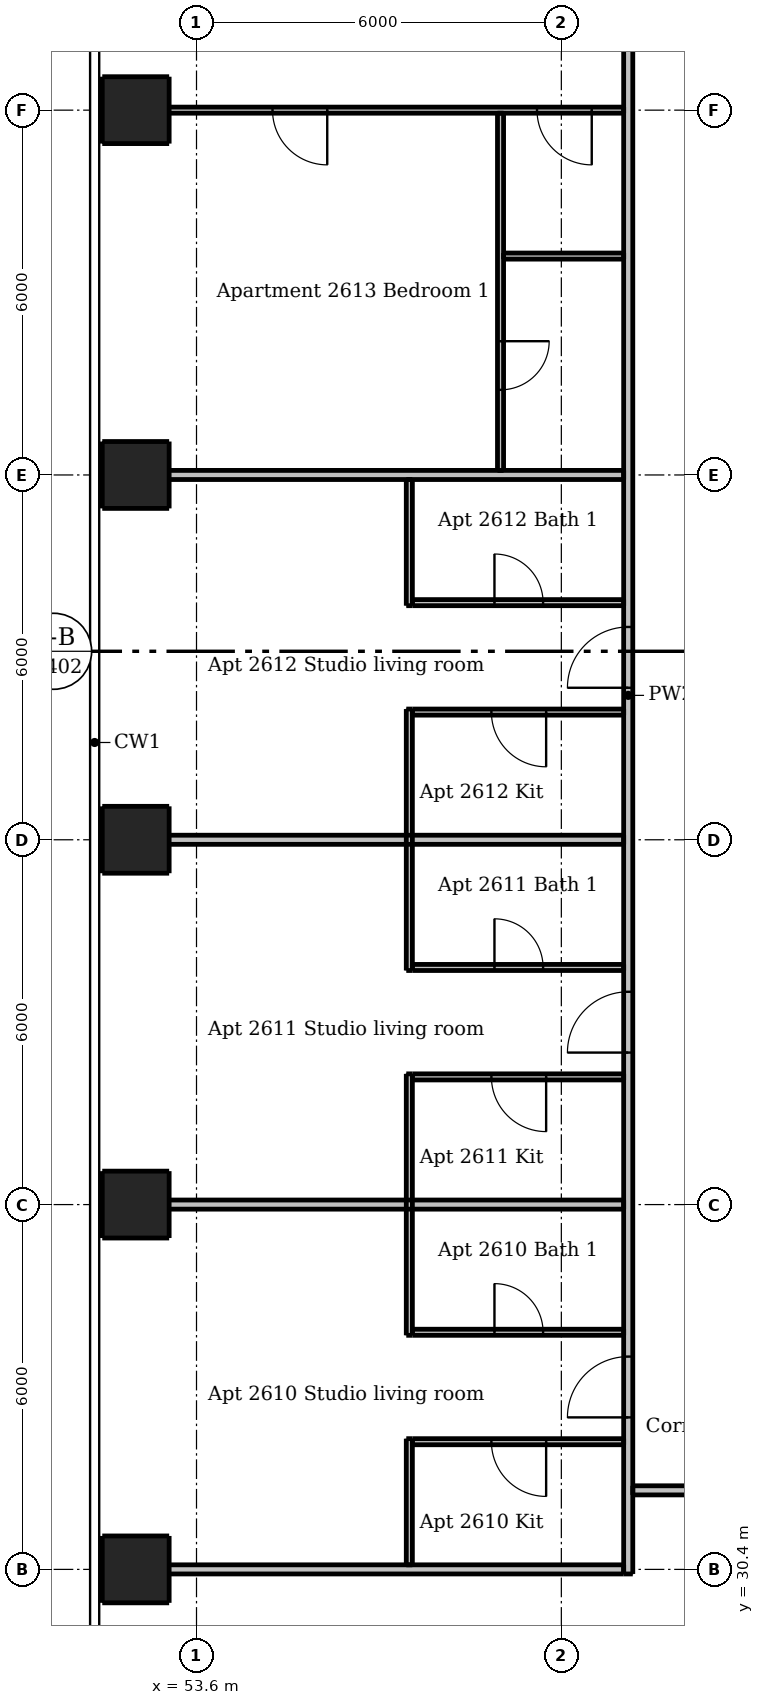
"""IFC4 building model, lengths in metres.
Left out: names, types, materials, properties, quantities, classifications, styles, units other than length and angle.
Written with IfcOpenShell. Run it as: python <this file> out.ifc"""

import sys

from ifc_helpers import new_model, si_unit, direction, frame, frame_2d, origin, origin_2d, place, context, subcontext, project, spatial, rectangle, extrude, element, fill, save


model = new_model("IFC4")
c1 = context("Model", 3, precision=1e-05, world=origin(), true_north=direction((0.0, 1.0)))
c2 = subcontext(c1, "Body", "Model", "MODEL_VIEW")
j1 = project(units=[si_unit("LENGTHUNIT", "METRE"), si_unit("PLANEANGLEUNIT", "RADIAN")], contexts=[c1])
p1 = place(None, origin())
s1 = spatial("IfcSite", under=j1, at=p1, CompositionType="ELEMENT")
p2 = place(p1, origin())
s2 = spatial("IfcBuilding", under=s1, at=p2, CompositionType="ELEMENT")
p3 = place(p2, frame((0.0, 0.0, 98.5)))
s3 = spatial("IfcBuildingStorey", under=s2, at=p3, CompositionType="ELEMENT", Elevation=98.5)
for number, where, z_axis, x_axis in (
    (1, (52.6, 30.4, 0.0), (0.0, 0.0, 1.0), (1.0, 0.0, 0.0)),
    (2, (52.6, 36.4, 0.0), (0.0, 0.0, 1.0), (1.0, 0.0, 0.0)),
    (3, (52.6, 42.4, 0.0), (0.0, 0.0, 1.0), (1.0, 0.0, 0.0)),
    (4, (52.6, 48.4, 0.0), (0.0, 0.0, 1.0), (1.0, 0.0, 0.0)),
    (5, (52.6, 54.4, 0.0), (0.0, 0.0, 1.0), (1.0, 0.0, 0.0)),
):
    element("IfcColumn", number, at=place(p3, frame(where, z_axis=z_axis, x_axis=x_axis)), inside=s3, PredefinedType="COLUMN", context=c2, shape_type="SweptSolid", body=[
        extrude(rectangle(XDim=1.1, YDim=1.1, at=origin_2d()), origin(), (0.0, 0.0, 1.0), 3.05),
    ])
p4 = place(p3, frame((57.1, 30.475, 0.0), z_axis=(0.0, 0.0, 1.0), x_axis=(0.0, 1.0, 0.0)))
e6 = element("IfcWall", 6, at=p4, inside=s3, PredefinedType="PARTITIONING", context=c2, shape_type="SweptSolid", body=[
    extrude(rectangle(XDim=2.075, YDim=0.1, at=frame_2d((1.038, 0.0))), origin(), (0.0, 0.0, 1.0), 3.05),
])
for number, where, z_axis, x_axis in (
    (7, (57.1, 34.25, 0.0), (0.0, 0.0, 1.0), (0.0, 1.0, 0.0)),
    (8, (57.1, 40.25, 0.0), (0.0, 0.0, 1.0), (0.0, 1.0, 0.0)),
):
    element("IfcWall", number, at=place(p3, frame(where, z_axis=z_axis, x_axis=x_axis)), inside=s3, PredefinedType="PARTITIONING", context=c2, shape_type="SweptSolid", body=[
        extrude(rectangle(XDim=4.3, YDim=0.1, at=frame_2d((2.15, 0.0))), origin(), (0.0, 0.0, 1.0), 3.05),
    ])
p5 = place(p3, frame((57.1, 46.25, 0.0), z_axis=(0.0, 0.0, 1.0), x_axis=(0.0, 1.0, 0.0)))
e9 = element("IfcWall", 9, at=p5, inside=s3, PredefinedType="PARTITIONING", context=c2, shape_type="SweptSolid", body=[
    extrude(rectangle(XDim=2.075, YDim=0.1, at=frame_2d((1.038, 0.0))), origin(), (0.0, 0.0, 1.0), 3.05),
])
p6 = place(p3, frame((58.6, 54.35, 0.0), z_axis=(0.0, 0.0, 1.0), x_axis=(0.0, -1.0, 0.0)))
e10 = element("IfcWall", 10, at=p6, inside=s3, PredefinedType="PARTITIONING", context=c2, shape_type="SweptSolid", body=[
    extrude(rectangle(XDim=5.875, YDim=0.1, at=frame_2d((2.938, 0.0))), origin(), (0.0, 0.0, 1.0), 3.05),
])
p7 = place(p6, frame((3.75, 0.0, 0.0)))
e11 = element("IfcOpeningElement", 11, at=p7, cuts=e10, PredefinedType="OPENING", context=c2, shape_type="SweptSolid", body=[
    extrude(rectangle(XDim=0.8, YDim=2.1, at=frame_2d((0.4, 1.05))), frame((0.0, 0.06, 0.0), z_axis=(0.0, -1.0, 0.0), x_axis=(1.0, 0.0, 0.0)), (0.0, 0.0, 1.0), 0.12),
])
p8 = place(p3, frame((60.625, 54.4, 0.0), z_axis=(0.0, 0.0, 1.0), x_axis=(-1.0, 0.0, 0.0)))
e12 = element("IfcWall", 12, at=p8, inside=s3, PredefinedType="PARTITIONING", context=c2, shape_type="SweptSolid", body=[
    extrude(rectangle(XDim=8.625, YDim=0.1, at=frame_2d((4.312, 0.0))), origin(), (0.0, 0.0, 1.0), 2.516),
])
p9 = place(p8, frame((0.525, 0.0, 0.0)))
e13 = element("IfcOpeningElement", 13, at=p9, cuts=e12, PredefinedType="OPENING", context=c2, shape_type="SweptSolid", body=[
    extrude(rectangle(XDim=0.9, YDim=2.1, at=frame_2d((0.45, 1.05))), frame((0.0, 0.06, 0.0), z_axis=(0.0, -1.0, 0.0), x_axis=(1.0, 0.0, 0.0)), (0.0, 0.0, 1.0), 0.12),
])
p10 = place(p8, frame((4.875, 0.0, 0.0)))
e14 = element("IfcOpeningElement", 14, at=p10, cuts=e12, PredefinedType="OPENING", context=c2, shape_type="SweptSolid", body=[
    extrude(rectangle(XDim=0.9, YDim=2.1, at=frame_2d((0.45, 1.05))), frame((0.0, 0.06, 0.0), z_axis=(0.0, -1.0, 0.0), x_axis=(1.0, 0.0, 0.0)), (0.0, 0.0, 1.0), 0.12),
])
p11 = place(p3, frame((58.65, 52.0, 0.0), z_axis=(0.0, 0.0, 1.0), x_axis=(1.0, 0.0, 0.0)))
e15 = element("IfcWall", 15, at=p11, inside=s3, PredefinedType="PARTITIONING", context=c2, shape_type="SweptSolid", body=[
    extrude(rectangle(XDim=1.975, YDim=0.1, at=frame_2d((0.988, 0.0))), origin(), (0.0, 0.0, 1.0), 3.05),
])
p12 = place(p3, frame((57.15, 46.3, 0.0), z_axis=(0.0, 0.0, 1.0), x_axis=(1.0, 0.0, 0.0)))
e16 = element("IfcWall", 16, at=p12, inside=s3, PredefinedType="PARTITIONING", context=c2, shape_type="SweptSolid", body=[
    extrude(rectangle(XDim=3.475, YDim=0.1, at=frame_2d((1.738, 0.0))), origin(), (0.0, 0.0, 1.0), 3.05),
])
p13 = place(p12, frame((1.35, 0.0, 0.0)))
e17 = element("IfcOpeningElement", 17, at=p13, cuts=e16, PredefinedType="OPENING", context=c2, shape_type="SweptSolid", body=[
    extrude(rectangle(XDim=0.8, YDim=2.1, at=frame_2d((0.4, 1.05))), frame((0.0, 0.06, 0.0), z_axis=(0.0, -1.0, 0.0), x_axis=(1.0, 0.0, 0.0)), (0.0, 0.0, 1.0), 0.12),
])
p14 = place(p3, frame((60.625, 44.5, 0.0), z_axis=(0.0, 0.0, 1.0), x_axis=(-1.0, 0.0, 0.0)))
e18 = element("IfcWall", 18, at=p14, inside=s3, PredefinedType="PARTITIONING", context=c2, shape_type="SweptSolid", body=[
    extrude(rectangle(XDim=3.475, YDim=0.1, at=frame_2d((1.738, 0.0))), origin(), (0.0, 0.0, 1.0), 3.05),
])
p15 = place(p14, frame((1.275, 0.0, 0.0)))
e19 = element("IfcOpeningElement", 19, at=p15, cuts=e18, PredefinedType="OPENING", context=c2, shape_type="SweptSolid", body=[
    extrude(rectangle(XDim=0.9, YDim=2.1, at=frame_2d((0.45, 1.05))), frame((0.0, 0.06, 0.0), z_axis=(0.0, -1.0, 0.0), x_axis=(1.0, 0.0, 0.0)), (0.0, 0.0, 1.0), 0.12),
])
p16 = place(p3, frame((57.15, 40.3, 0.0), z_axis=(0.0, 0.0, 1.0), x_axis=(1.0, 0.0, 0.0)))
e20 = element("IfcWall", 20, at=p16, inside=s3, PredefinedType="PARTITIONING", context=c2, shape_type="SweptSolid", body=[
    extrude(rectangle(XDim=3.475, YDim=0.1, at=frame_2d((1.738, 0.0))), origin(), (0.0, 0.0, 1.0), 3.05),
])
p17 = place(p16, frame((1.35, 0.0, 0.0)))
e21 = element("IfcOpeningElement", 21, at=p17, cuts=e20, PredefinedType="OPENING", context=c2, shape_type="SweptSolid", body=[
    extrude(rectangle(XDim=0.8, YDim=2.1, at=frame_2d((0.4, 1.05))), frame((0.0, 0.06, 0.0), z_axis=(0.0, -1.0, 0.0), x_axis=(1.0, 0.0, 0.0)), (0.0, 0.0, 1.0), 0.12),
])
p18 = place(p3, frame((60.625, 38.5, 0.0), z_axis=(0.0, 0.0, 1.0), x_axis=(-1.0, 0.0, 0.0)))
e22 = element("IfcWall", 22, at=p18, inside=s3, PredefinedType="PARTITIONING", context=c2, shape_type="SweptSolid", body=[
    extrude(rectangle(XDim=3.475, YDim=0.1, at=frame_2d((1.738, 0.0))), origin(), (0.0, 0.0, 1.0), 3.05),
])
p19 = place(p18, frame((1.275, 0.0, 0.0)))
e23 = element("IfcOpeningElement", 23, at=p19, cuts=e22, PredefinedType="OPENING", context=c2, shape_type="SweptSolid", body=[
    extrude(rectangle(XDim=0.9, YDim=2.1, at=frame_2d((0.45, 1.05))), frame((0.0, 0.06, 0.0), z_axis=(0.0, -1.0, 0.0), x_axis=(1.0, 0.0, 0.0)), (0.0, 0.0, 1.0), 0.12),
])
p20 = place(p3, frame((57.15, 34.3, 0.0), z_axis=(0.0, 0.0, 1.0), x_axis=(1.0, 0.0, 0.0)))
e24 = element("IfcWall", 24, at=p20, inside=s3, PredefinedType="PARTITIONING", context=c2, shape_type="SweptSolid", body=[
    extrude(rectangle(XDim=3.475, YDim=0.1, at=frame_2d((1.738, 0.0))), origin(), (0.0, 0.0, 1.0), 3.05),
])
p21 = place(p20, frame((1.35, 0.0, 0.0)))
e25 = element("IfcOpeningElement", 25, at=p21, cuts=e24, PredefinedType="OPENING", context=c2, shape_type="SweptSolid", body=[
    extrude(rectangle(XDim=0.8, YDim=2.1, at=frame_2d((0.4, 1.05))), frame((0.0, 0.06, 0.0), z_axis=(0.0, -1.0, 0.0), x_axis=(1.0, 0.0, 0.0)), (0.0, 0.0, 1.0), 0.12),
])
p22 = place(p3, frame((60.625, 32.5, 0.0), z_axis=(0.0, 0.0, 1.0), x_axis=(-1.0, 0.0, 0.0)))
e26 = element("IfcWall", 26, at=p22, inside=s3, PredefinedType="PARTITIONING", context=c2, shape_type="SweptSolid", body=[
    extrude(rectangle(XDim=3.475, YDim=0.1, at=frame_2d((1.738, 0.0))), origin(), (0.0, 0.0, 1.0), 3.05),
])
p23 = place(p22, frame((1.275, 0.0, 0.0)))
e27 = element("IfcOpeningElement", 27, at=p23, cuts=e26, PredefinedType="OPENING", context=c2, shape_type="SweptSolid", body=[
    extrude(rectangle(XDim=0.9, YDim=2.1, at=frame_2d((0.45, 1.05))), frame((0.0, 0.06, 0.0), z_axis=(0.0, -1.0, 0.0), x_axis=(1.0, 0.0, 0.0)), (0.0, 0.0, 1.0), 0.12),
])
p24 = place(p3, frame((60.7, 30.325, 0.0), z_axis=(0.0, 0.0, 1.0), x_axis=(0.0, 1.0, 0.0)))
e28 = element("IfcWall", 28, at=p24, inside=s3, PredefinedType="PARTITIONING", context=c2, shape_type="SweptSolid", body=[
    extrude(rectangle(XDim=28.9, YDim=0.15, at=frame_2d((14.45, 0.0))), origin(), (0.0, 0.0, 1.0), 3.05),
])
p25 = place(p24, frame((2.575, 0.0, 0.0)))
e29 = element("IfcOpeningElement", 29, at=p25, cuts=e28, PredefinedType="OPENING", context=c2, shape_type="SweptSolid", body=[
    extrude(rectangle(XDim=1.0, YDim=2.1, at=frame_2d((0.5, 1.05))), frame((0.0, 0.085, 0.0), z_axis=(0.0, -1.0, 0.0), x_axis=(1.0, 0.0, 0.0)), (0.0, 0.0, 1.0), 0.17),
])
p26 = place(p24, frame((8.575, 0.0, 0.0)))
e30 = element("IfcOpeningElement", 30, at=p26, cuts=e28, PredefinedType="OPENING", context=c2, shape_type="SweptSolid", body=[
    extrude(rectangle(XDim=1.0, YDim=2.1, at=frame_2d((0.5, 1.05))), frame((0.0, 0.085, 0.0), z_axis=(0.0, -1.0, 0.0), x_axis=(1.0, 0.0, 0.0)), (0.0, 0.0, 1.0), 0.17),
])
p27 = place(p24, frame((14.575, 0.0, 0.0)))
e31 = element("IfcOpeningElement", 31, at=p27, cuts=e28, PredefinedType="OPENING", context=c2, shape_type="SweptSolid", body=[
    extrude(rectangle(XDim=1.0, YDim=2.1, at=frame_2d((0.5, 1.05))), frame((0.0, 0.085, 0.0), z_axis=(0.0, -1.0, 0.0), x_axis=(1.0, 0.0, 0.0)), (0.0, 0.0, 1.0), 0.17),
])
p28 = place(p24, frame((26.025, 0.0, 0.0)))
e32 = element("IfcOpeningElement", 32, at=p28, cuts=e28, PredefinedType="OPENING", context=c2, shape_type="SweptSolid", body=[
    extrude(rectangle(XDim=1.0, YDim=2.1, at=frame_2d((0.5, 1.05))), frame((0.0, 0.085, 0.0), z_axis=(0.0, -1.0, 0.0), x_axis=(1.0, 0.0, 0.0)), (0.0, 0.0, 1.0), 0.17),
])
for number, where, z_axis, x_axis in (
    (33, (52.0, 48.4, 0.0), (0.0, 0.0, 1.0), (1.0, 0.0, 0.0)),
    (34, (52.0, 42.4, 0.0), (0.0, 0.0, 1.0), (1.0, 0.0, 0.0)),
    (35, (52.0, 36.4, 0.0), (0.0, 0.0, 1.0), (1.0, 0.0, 0.0)),
):
    element("IfcWall", number, at=place(p3, frame(where, z_axis=z_axis, x_axis=x_axis)), inside=s3, PredefinedType="PARTITIONING", context=c2, shape_type="SweptSolid", body=[
        extrude(rectangle(XDim=8.625, YDim=0.15, at=frame_2d((4.312, 0.0))), origin(), (0.0, 0.0, 1.0), 2.516),
    ])
p29 = place(p3, frame((89.525, 31.7, 0.0), z_axis=(0.0, 0.0, 1.0), x_axis=(-1.0, 0.0, 0.0)))
e36 = element("IfcWall", 36, at=p29, inside=s3, PredefinedType="PARTITIONING", context=c2, shape_type="SweptSolid", body=[
    extrude(rectangle(XDim=28.75, YDim=0.15, at=frame_2d((14.375, 0.0))), origin(), (0.0, 0.0, 1.0), 3.05),
])
p30 = place(p29, frame((25.875, 0.0, 0.0)))
e37 = element("IfcOpeningElement", 37, at=p30, cuts=e36, PredefinedType="OPENING", context=c2, shape_type="SweptSolid", body=[
    extrude(rectangle(XDim=1.0, YDim=2.1, at=frame_2d((0.5, 1.05))), frame((0.0, 0.085, 0.0), z_axis=(0.0, -1.0, 0.0), x_axis=(1.0, 0.0, 0.0)), (0.0, 0.0, 1.0), 0.17),
])
p31 = place(p29, frame((12.525, 0.0, 0.0)))
e38 = element("IfcOpeningElement", 38, at=p31, cuts=e36, PredefinedType="OPENING", context=c2, shape_type="SweptSolid", body=[
    extrude(rectangle(XDim=1.0, YDim=2.1, at=frame_2d((0.5, 1.05))), frame((0.0, 0.085, 0.0), z_axis=(0.0, -1.0, 0.0), x_axis=(1.0, 0.0, 0.0)), (0.0, 0.0, 1.0), 0.17),
])
p32 = place(p29, frame((4.175, 0.0, 0.0)))
e39 = element("IfcOpeningElement", 39, at=p32, cuts=e36, PredefinedType="OPENING", context=c2, shape_type="SweptSolid", body=[
    extrude(rectangle(XDim=1.0, YDim=2.1, at=frame_2d((0.5, 1.05))), frame((0.0, 0.085, 0.0), z_axis=(0.0, -1.0, 0.0), x_axis=(1.0, 0.0, 0.0)), (0.0, 0.0, 1.0), 0.17),
])
p33 = place(p3, frame((52.0, 30.4, 0.0), z_axis=(0.0, 0.0, 1.0), x_axis=(1.0, 0.0, 0.0)))
e40 = element("IfcWall", 40, at=p33, inside=s3, PredefinedType="PARTITIONING", context=c2, shape_type="SweptSolid", body=[
    extrude(rectangle(XDim=8.625, YDim=0.15, at=frame_2d((4.312, 0.0))), origin(), (0.0, 0.0, 1.0), 2.647),
])
p34 = place(p25, origin())
e41 = element("IfcDoor", 41, at=p34, inside=s3, OperationType="SINGLE_SWING_LEFT", PredefinedType="DOOR", context=c2, shape_type="SweptSolid", body=[
    extrude(rectangle(XDim=1.0, YDim=2.1, at=frame_2d((0.5, 1.05))), frame((0.0, 0.025, 0.0), z_axis=(0.0, -1.0, 0.0), x_axis=(1.0, 0.0, 0.0)), (0.0, 0.0, 1.0), 0.05),
])
fill(e29, e41)
p35 = place(p23, origin())
e42 = element("IfcDoor", 42, at=p35, inside=s3, OperationType="SINGLE_SWING_LEFT", PredefinedType="DOOR", context=c2, shape_type="SweptSolid", body=[
    extrude(rectangle(XDim=0.9, YDim=2.1, at=frame_2d((0.45, 1.05))), frame((0.0, 0.025, 0.0), z_axis=(0.0, -1.0, 0.0), x_axis=(1.0, 0.0, 0.0)), (0.0, 0.0, 1.0), 0.05),
])
fill(e27, e42)
p36 = place(p21, origin())
e43 = element("IfcDoor", 43, at=p36, inside=s3, OperationType="SINGLE_SWING_LEFT", PredefinedType="DOOR", context=c2, shape_type="SweptSolid", body=[
    extrude(rectangle(XDim=0.8, YDim=2.1, at=frame_2d((0.4, 1.05))), frame((0.0, 0.025, 0.0), z_axis=(0.0, -1.0, 0.0), x_axis=(1.0, 0.0, 0.0)), (0.0, 0.0, 1.0), 0.05),
])
fill(e25, e43)
p37 = place(p26, origin())
e44 = element("IfcDoor", 44, at=p37, inside=s3, OperationType="SINGLE_SWING_LEFT", PredefinedType="DOOR", context=c2, shape_type="SweptSolid", body=[
    extrude(rectangle(XDim=1.0, YDim=2.1, at=frame_2d((0.5, 1.05))), frame((0.0, 0.025, 0.0), z_axis=(0.0, -1.0, 0.0), x_axis=(1.0, 0.0, 0.0)), (0.0, 0.0, 1.0), 0.05),
])
fill(e30, e44)
p38 = place(p19, origin())
e45 = element("IfcDoor", 45, at=p38, inside=s3, OperationType="SINGLE_SWING_LEFT", PredefinedType="DOOR", context=c2, shape_type="SweptSolid", body=[
    extrude(rectangle(XDim=0.9, YDim=2.1, at=frame_2d((0.45, 1.05))), frame((0.0, 0.025, 0.0), z_axis=(0.0, -1.0, 0.0), x_axis=(1.0, 0.0, 0.0)), (0.0, 0.0, 1.0), 0.05),
])
fill(e23, e45)
p39 = place(p17, origin())
e46 = element("IfcDoor", 46, at=p39, inside=s3, OperationType="SINGLE_SWING_LEFT", PredefinedType="DOOR", context=c2, shape_type="SweptSolid", body=[
    extrude(rectangle(XDim=0.8, YDim=2.1, at=frame_2d((0.4, 1.05))), frame((0.0, 0.025, 0.0), z_axis=(0.0, -1.0, 0.0), x_axis=(1.0, 0.0, 0.0)), (0.0, 0.0, 1.0), 0.05),
])
fill(e21, e46)
p40 = place(p27, origin())
e47 = element("IfcDoor", 47, at=p40, inside=s3, OperationType="SINGLE_SWING_LEFT", PredefinedType="DOOR", context=c2, shape_type="SweptSolid", body=[
    extrude(rectangle(XDim=1.0, YDim=2.1, at=frame_2d((0.5, 1.05))), frame((0.0, 0.025, 0.0), z_axis=(0.0, -1.0, 0.0), x_axis=(1.0, 0.0, 0.0)), (0.0, 0.0, 1.0), 0.05),
])
fill(e31, e47)
p41 = place(p15, origin())
e48 = element("IfcDoor", 48, at=p41, inside=s3, OperationType="SINGLE_SWING_LEFT", PredefinedType="DOOR", context=c2, shape_type="SweptSolid", body=[
    extrude(rectangle(XDim=0.9, YDim=2.1, at=frame_2d((0.45, 1.05))), frame((0.0, 0.025, 0.0), z_axis=(0.0, -1.0, 0.0), x_axis=(1.0, 0.0, 0.0)), (0.0, 0.0, 1.0), 0.05),
])
fill(e19, e48)
p42 = place(p13, origin())
e49 = element("IfcDoor", 49, at=p42, inside=s3, OperationType="SINGLE_SWING_LEFT", PredefinedType="DOOR", context=c2, shape_type="SweptSolid", body=[
    extrude(rectangle(XDim=0.8, YDim=2.1, at=frame_2d((0.4, 1.05))), frame((0.0, 0.025, 0.0), z_axis=(0.0, -1.0, 0.0), x_axis=(1.0, 0.0, 0.0)), (0.0, 0.0, 1.0), 0.05),
])
fill(e17, e49)
p43 = place(p9, origin())
e50 = element("IfcDoor", 50, at=p43, inside=s3, OperationType="SINGLE_SWING_LEFT", PredefinedType="DOOR", context=c2, shape_type="SweptSolid", body=[
    extrude(rectangle(XDim=0.9, YDim=2.1, at=frame_2d((0.45, 1.05))), frame((0.0, 0.025, 0.0), z_axis=(0.0, -1.0, 0.0), x_axis=(1.0, 0.0, 0.0)), (0.0, 0.0, 1.0), 0.05),
])
fill(e13, e50)
p44 = place(p10, origin())
e51 = element("IfcDoor", 51, at=p44, inside=s3, OperationType="SINGLE_SWING_LEFT", PredefinedType="DOOR", context=c2, shape_type="SweptSolid", body=[
    extrude(rectangle(XDim=0.9, YDim=2.1, at=frame_2d((0.45, 1.05))), frame((0.0, 0.025, 0.0), z_axis=(0.0, -1.0, 0.0), x_axis=(1.0, 0.0, 0.0)), (0.0, 0.0, 1.0), 0.05),
])
fill(e14, e51)
p45 = place(p7, origin())
e52 = element("IfcDoor", 52, at=p45, inside=s3, OperationType="SINGLE_SWING_LEFT", PredefinedType="DOOR", context=c2, shape_type="SweptSolid", body=[
    extrude(rectangle(XDim=0.8, YDim=2.1, at=frame_2d((0.4, 1.05))), frame((0.0, 0.025, 0.0), z_axis=(0.0, -1.0, 0.0), x_axis=(1.0, 0.0, 0.0)), (0.0, 0.0, 1.0), 0.05),
])
fill(e11, e52)
save(model, sys.argv[1])
